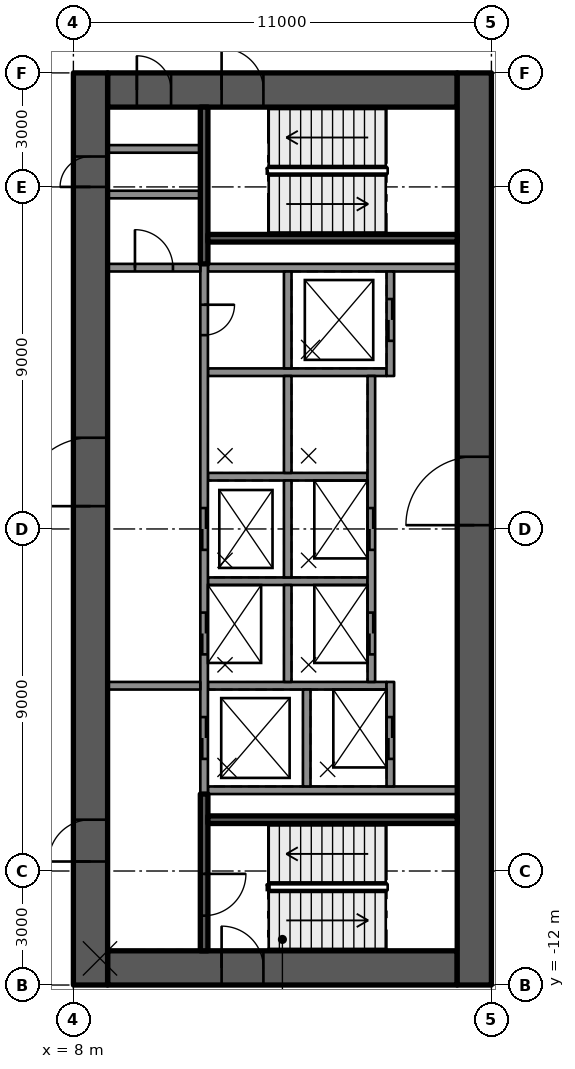
"""IFC4 building model, lengths in metres.
Left out: names, types, materials, properties, quantities, classifications, styles, units other than length and angle.
Written with IfcOpenShell. Run it as: python <this file> out.ifc"""

import sys

from ifc_helpers import new_model, si_unit, direction, frame, frame_2d, origin, place, context, subcontext, project, spatial, rectangle, extrude, element, fill, save


model = new_model("IFC4")
c1 = context("Model", 3, precision=1e-05, world=origin(), true_north=direction((0.0, 1.0)))
c2 = subcontext(c1, "Body", "Model", "MODEL_VIEW")
j1 = project(units=[si_unit("LENGTHUNIT", "METRE"), si_unit("PLANEANGLEUNIT", "RADIAN")], contexts=[c1])
p1 = place(None, origin())
s1 = spatial("IfcSite", under=j1, at=p1, CompositionType="ELEMENT")
p2 = place(p1, origin())
s2 = spatial("IfcBuilding", under=s1, at=p2, CompositionType="ELEMENT")
p3 = place(p2, frame((0.0, 0.0, 33.3)))
s3 = spatial("IfcBuildingStorey", under=s2, at=p3, CompositionType="ELEMENT", Elevation=33.3)
p4 = place(p3, frame((8.9, 11.55, 0.0), z_axis=(0.0, 0.0, 1.0), x_axis=(1.0, 0.0, 0.0)))
e1 = element("IfcWall", 1, at=p4, inside=s3, PredefinedType="SHEAR", context=c2, shape_type="SweptSolid", body=[
    extrude(rectangle(XDim=9.2, YDim=0.9, at=frame_2d((4.6, 0.0))), origin(), (0.0, 0.0, 1.0), 4.0),
])
p5 = place(p4, frame((3.0, 0.0, 0.0)))
e2 = element("IfcOpeningElement", 2, at=p5, cuts=e1, PredefinedType="OPENING", context=c2, shape_type="SweptSolid", body=[
    extrude(rectangle(XDim=1.1, YDim=2.1, at=frame_2d((0.55, 1.05))), frame((0.0, 0.46, 0.0), z_axis=(0.0, -1.0, 0.0), x_axis=(1.0, 0.0, 0.0)), (0.0, 0.0, 1.0), 0.92),
])
p6 = place(p4, frame((0.77, 0.0, 0.0)))
e3 = element("IfcOpeningElement", 3, at=p6, cuts=e1, PredefinedType="OPENING", context=c2, shape_type="SweptSolid", body=[
    extrude(rectangle(XDim=0.9, YDim=2.1, at=frame_2d((0.45, 1.05))), frame((0.0, 0.46, 0.0), z_axis=(0.0, -1.0, 0.0), x_axis=(1.0, 0.0, 0.0)), (0.0, 0.0, 1.0), 0.92),
])
p7 = place(p3, frame((8.9, -11.55, 0.0), z_axis=(0.0, 0.0, 1.0), x_axis=(1.0, 0.0, 0.0)))
e4 = element("IfcWall", 4, at=p7, inside=s3, PredefinedType="SHEAR", context=c2, shape_type="SweptSolid", body=[
    extrude(rectangle(XDim=9.2, YDim=0.9, at=frame_2d((4.6, 0.0))), origin(), (0.0, 0.0, 1.0), 4.0),
])
p8 = place(p7, frame((3.0, 0.0, 0.0)))
e5 = element("IfcOpeningElement", 5, at=p8, cuts=e4, PredefinedType="OPENING", context=c2, shape_type="SweptSolid", body=[
    extrude(rectangle(XDim=1.1, YDim=2.1, at=frame_2d((0.55, 1.05))), frame((0.0, 0.46, 0.0), z_axis=(0.0, -1.0, 0.0), x_axis=(1.0, 0.0, 0.0)), (0.0, 0.0, 1.0), 0.92),
])
p9 = place(p3, frame((8.45, -12.0, 0.0), z_axis=(0.0, 0.0, 1.0), x_axis=(0.0, 1.0, 0.0)))
e6 = element("IfcWall", 6, at=p9, inside=s3, PredefinedType="SHEAR", context=c2, shape_type="SweptSolid", body=[
    extrude(rectangle(XDim=24.0, YDim=0.9, at=frame_2d((12.0, 0.0))), origin(), (0.0, 0.0, 1.0), 4.0),
])
p10 = place(p9, frame((12.6, 0.0, 0.0)))
e7 = element("IfcOpeningElement", 7, at=p10, cuts=e6, PredefinedType="OPENING", context=c2, shape_type="SweptSolid", body=[
    extrude(rectangle(XDim=1.8, YDim=2.1, at=frame_2d((0.9, 1.05))), frame((0.0, 0.46, 0.0), z_axis=(0.0, -1.0, 0.0), x_axis=(1.0, 0.0, 0.0)), (0.0, 0.0, 1.0), 0.92),
])
p11 = place(p9, frame((3.25, 0.0, 0.0)))
e8 = element("IfcOpeningElement", 8, at=p11, cuts=e6, PredefinedType="OPENING", context=c2, shape_type="SweptSolid", body=[
    extrude(rectangle(XDim=1.1, YDim=2.1, at=frame_2d((0.55, 1.05))), frame((0.0, 0.46, 0.0), z_axis=(0.0, -1.0, 0.0), x_axis=(1.0, 0.0, 0.0)), (0.0, 0.0, 1.0), 0.92),
])
p12 = place(p9, frame((21.0, 0.0, 0.0)))
e9 = element("IfcOpeningElement", 9, at=p12, cuts=e6, PredefinedType="OPENING", context=c2, shape_type="SweptSolid", body=[
    extrude(rectangle(XDim=0.8, YDim=2.1, at=frame_2d((0.4, 1.05))), frame((0.0, 0.46, 0.0), z_axis=(0.0, -1.0, 0.0), x_axis=(1.0, 0.0, 0.0)), (0.0, 0.0, 1.0), 0.92),
])
p13 = place(p3, frame((18.55, -12.0, 0.0), z_axis=(0.0, 0.0, 1.0), x_axis=(0.0, 1.0, 0.0)))
e10 = element("IfcWall", 10, at=p13, inside=s3, PredefinedType="SHEAR", context=c2, shape_type="SweptSolid", body=[
    extrude(rectangle(XDim=24.0, YDim=0.9, at=frame_2d((12.0, 0.0))), origin(), (0.0, 0.0, 1.0), 4.0),
])
p14 = place(p13, frame((12.1, 0.0, 0.0)))
e11 = element("IfcOpeningElement", 11, at=p14, cuts=e10, PredefinedType="OPENING", context=c2, shape_type="SweptSolid", body=[
    extrude(rectangle(XDim=1.8, YDim=2.1, at=frame_2d((0.9, 1.05))), frame((0.0, 0.46, 0.0), z_axis=(0.0, -1.0, 0.0), x_axis=(1.0, 0.0, 0.0)), (0.0, 0.0, 1.0), 0.92),
])
for number, where, z_axis, x_axis in (
    (12, (11.54, -6.875, 0.0), (0.0, 0.0, 1.0), (1.0, 0.0, 0.0)),
    (13, (11.54, 6.875, 0.0), (0.0, 0.0, 1.0), (1.0, 0.0, 0.0)),
):
    element("IfcWall", number, at=place(p3, frame(where, z_axis=z_axis, x_axis=x_axis)), inside=s3, PredefinedType="SOLIDWALL", context=c2, shape_type="SweptSolid", body=[
        extrude(rectangle(XDim=6.56, YDim=0.2, at=frame_2d((3.28, 0.0))), origin(), (0.0, 0.0, 1.0), 3.58),
    ])
p15 = place(p3, frame((11.54, 4.125, 0.0), z_axis=(0.0, 0.0, 1.0), x_axis=(1.0, 0.0, 0.0)))
e14 = element("IfcWall", 14, at=p15, inside=s3, PredefinedType="SOLIDWALL", context=c2, shape_type="SweptSolid", body=[
    extrude(rectangle(XDim=4.7, YDim=0.2, at=frame_2d((2.35, 0.0))), origin(), (0.0, 0.0, 1.0), 3.58),
])
for number, where, z_axis, x_axis in (
    (15, (11.54, 1.375, 0.0), (0.0, 0.0, 1.0), (1.0, 0.0, 0.0)),
    (16, (11.54, -1.375, 0.0), (0.0, 0.0, 1.0), (1.0, 0.0, 0.0)),
):
    element("IfcWall", number, at=place(p3, frame(where, z_axis=z_axis, x_axis=x_axis)), inside=s3, PredefinedType="SOLIDWALL", context=c2, shape_type="SweptSolid", body=[
        extrude(rectangle(XDim=4.2, YDim=0.2, at=frame_2d((2.1, 0.0))), origin(), (0.0, 0.0, 1.0), 3.58),
    ])
p16 = place(p3, frame((11.54, -4.125, 0.0), z_axis=(0.0, 0.0, 1.0), x_axis=(1.0, 0.0, 0.0)))
e17 = element("IfcWall", 17, at=p16, inside=s3, PredefinedType="SOLIDWALL", context=c2, shape_type="SweptSolid", body=[
    extrude(rectangle(XDim=4.7, YDim=0.2, at=frame_2d((2.35, 0.0))), origin(), (0.0, 0.0, 1.0), 3.58),
])
p17 = place(p3, frame((11.44, 6.975, 0.0), z_axis=(0.0, 0.0, 1.0), x_axis=(0.0, -1.0, 0.0)))
e18 = element("IfcWall", 18, at=p17, inside=s3, PredefinedType="SOLIDWALL", context=c2, shape_type="SweptSolid", body=[
    extrude(rectangle(XDim=13.95, YDim=0.2, at=frame_2d((6.975, 0.0))), origin(), (0.0, 0.0, 1.0), 3.58),
])
p18 = place(p17, frame((6.425, 0.0, 0.0)))
e19 = element("IfcOpeningElement", 19, at=p18, cuts=e18, PredefinedType="OPENING", context=c2, shape_type="SweptSolid", body=[
    extrude(rectangle(XDim=1.1, YDim=2.1, at=frame_2d((0.55, 1.05))), frame((0.0, 0.11, 0.0), z_axis=(0.0, -1.0, 0.0), x_axis=(1.0, 0.0, 0.0)), (0.0, 0.0, 1.0), 0.22),
])
p19 = place(p17, frame((9.175, 0.0, 0.0)))
e20 = element("IfcOpeningElement", 20, at=p19, cuts=e18, PredefinedType="OPENING", context=c2, shape_type="SweptSolid", body=[
    extrude(rectangle(XDim=1.1, YDim=2.1, at=frame_2d((0.55, 1.05))), frame((0.0, 0.11, 0.0), z_axis=(0.0, -1.0, 0.0), x_axis=(1.0, 0.0, 0.0)), (0.0, 0.0, 1.0), 0.22),
])
p20 = place(p17, frame((11.925, 0.0, 0.0)))
e21 = element("IfcOpeningElement", 21, at=p20, cuts=e18, PredefinedType="OPENING", context=c2, shape_type="SweptSolid", body=[
    extrude(rectangle(XDim=1.1, YDim=2.1, at=frame_2d((0.55, 1.05))), frame((0.0, 0.11, 0.0), z_axis=(0.0, -1.0, 0.0), x_axis=(1.0, 0.0, 0.0)), (0.0, 0.0, 1.0), 0.22),
])
p21 = place(p17, frame((1.075, 0.0, 0.0)))
e22 = element("IfcOpeningElement", 22, at=p21, cuts=e18, PredefinedType="OPENING", context=c2, shape_type="SweptSolid", body=[
    extrude(rectangle(XDim=0.8, YDim=2.1, at=frame_2d((0.4, 1.05))), frame((0.0, 0.11, 0.0), z_axis=(0.0, -1.0, 0.0), x_axis=(1.0, 0.0, 0.0)), (0.0, 0.0, 1.0), 0.22),
])
for number, where, z_axis, x_axis in (
    (23, (13.64, 6.775, 0.0), (0.0, 0.0, 1.0), (0.0, -1.0, 0.0)),
    (24, (13.64, 4.025, 0.0), (0.0, 0.0, 1.0), (0.0, -1.0, 0.0)),
    (25, (13.64, 1.275, 0.0), (0.0, 0.0, 1.0), (0.0, -1.0, 0.0)),
    (26, (13.64, -1.475, 0.0), (0.0, 0.0, 1.0), (0.0, -1.0, 0.0)),
    (27, (14.14, -4.225, 0.0), (0.0, 0.0, 1.0), (0.0, -1.0, 0.0)),
):
    element("IfcWall", number, at=place(p3, frame(where, z_axis=z_axis, x_axis=x_axis)), inside=s3, PredefinedType="SOLIDWALL", context=c2, shape_type="SweptSolid", body=[
        extrude(rectangle(XDim=2.55, YDim=0.2, at=frame_2d((1.275, 0.0))), origin(), (0.0, 0.0, 1.0), 3.58),
    ])
p22 = place(p3, frame((16.34, 6.775, 0.0), z_axis=(0.0, 0.0, 1.0), x_axis=(0.0, -1.0, 0.0)))
e28 = element("IfcWall", 28, at=p22, inside=s3, PredefinedType="SOLIDWALL", context=c2, shape_type="SweptSolid", body=[
    extrude(rectangle(XDim=2.75, YDim=0.2, at=frame_2d((1.375, 0.0))), origin(), (0.0, 0.0, 1.0), 3.58),
])
p23 = place(p22, frame((0.725, 0.0, 0.0)))
e29 = element("IfcOpeningElement", 29, at=p23, cuts=e28, PredefinedType="OPENING", context=c2, shape_type="SweptSolid", body=[
    extrude(rectangle(XDim=1.1, YDim=2.1, at=frame_2d((0.55, 1.05))), frame((0.0, 0.11, 0.0), z_axis=(0.0, -1.0, 0.0), x_axis=(1.0, 0.0, 0.0)), (0.0, 0.0, 1.0), 0.22),
])
p24 = place(p3, frame((15.84, 4.025, 0.0), z_axis=(0.0, 0.0, 1.0), x_axis=(0.0, -1.0, 0.0)))
e30 = element("IfcWall", 30, at=p24, inside=s3, PredefinedType="SOLIDWALL", context=c2, shape_type="SweptSolid", body=[
    extrude(rectangle(XDim=8.05, YDim=0.2, at=frame_2d((4.025, 0.0))), origin(), (0.0, 0.0, 1.0), 3.58),
])
p25 = place(p24, frame((3.475, 0.0, 0.0)))
e31 = element("IfcOpeningElement", 31, at=p25, cuts=e30, PredefinedType="OPENING", context=c2, shape_type="SweptSolid", body=[
    extrude(rectangle(XDim=1.1, YDim=2.1, at=frame_2d((0.55, 1.05))), frame((0.0, 0.11, 0.0), z_axis=(0.0, -1.0, 0.0), x_axis=(1.0, 0.0, 0.0)), (0.0, 0.0, 1.0), 0.22),
])
p26 = place(p24, frame((6.225, 0.0, 0.0)))
e32 = element("IfcOpeningElement", 32, at=p26, cuts=e30, PredefinedType="OPENING", context=c2, shape_type="SweptSolid", body=[
    extrude(rectangle(XDim=1.1, YDim=2.1, at=frame_2d((0.55, 1.05))), frame((0.0, 0.11, 0.0), z_axis=(0.0, -1.0, 0.0), x_axis=(1.0, 0.0, 0.0)), (0.0, 0.0, 1.0), 0.22),
])
p27 = place(p3, frame((16.34, -4.025, 0.0), z_axis=(0.0, 0.0, 1.0), x_axis=(0.0, -1.0, 0.0)))
e33 = element("IfcWall", 33, at=p27, inside=s3, PredefinedType="SOLIDWALL", context=c2, shape_type="SweptSolid", body=[
    extrude(rectangle(XDim=2.75, YDim=0.2, at=frame_2d((1.375, 0.0))), origin(), (0.0, 0.0, 1.0), 3.58),
])
p28 = place(p27, frame((0.925, 0.0, 0.0)))
e34 = element("IfcOpeningElement", 34, at=p28, cuts=e33, PredefinedType="OPENING", context=c2, shape_type="SweptSolid", body=[
    extrude(rectangle(XDim=1.1, YDim=2.1, at=frame_2d((0.55, 1.05))), frame((0.0, 0.11, 0.0), z_axis=(0.0, -1.0, 0.0), x_axis=(1.0, 0.0, 0.0)), (0.0, 0.0, 1.0), 0.22),
])
p29 = place(p3, frame((11.44, -6.975, 0.0), z_axis=(0.0, 0.0, 1.0), x_axis=(0.0, -1.0, 0.0)))
e35 = element("IfcWall", 35, at=p29, inside=s3, PredefinedType="SOLIDWALL", context=c2, shape_type="SweptSolid", body=[
    extrude(rectangle(XDim=4.125, YDim=0.2, at=frame_2d((2.062, 0.0))), origin(), (0.0, 0.0, 1.0), 3.58),
])
p30 = place(p29, frame((2.1, 0.0, 0.0)))
e36 = element("IfcOpeningElement", 36, at=p30, cuts=e35, PredefinedType="OPENING", context=c2, shape_type="SweptSolid", body=[
    extrude(rectangle(XDim=1.1, YDim=2.1, at=frame_2d((0.55, 1.05))), frame((0.0, 0.11, 0.0), z_axis=(0.0, -1.0, 0.0), x_axis=(1.0, 0.0, 0.0)), (0.0, 0.0, 1.0), 0.22),
])
p31 = place(p3, frame((11.54, -7.65, 0.0), z_axis=(0.0, 0.0, 1.0), x_axis=(1.0, 0.0, 0.0)))
e37 = element("IfcWall", 37, at=p31, inside=s3, PredefinedType="SOLIDWALL", context=c2, shape_type="SweptSolid", body=[
    extrude(rectangle(XDim=6.56, YDim=0.2, at=frame_2d((3.28, 0.0))), origin(), (0.0, 0.0, 1.0), 3.58),
])
p32 = place(p3, frame((11.44, 11.1, 0.0), z_axis=(0.0, 0.0, 1.0), x_axis=(0.0, -1.0, 0.0)))
e38 = element("IfcWall", 38, at=p32, inside=s3, PredefinedType="SOLIDWALL", context=c2, shape_type="SweptSolid", body=[
    extrude(rectangle(XDim=4.125, YDim=0.2, at=frame_2d((2.062, 0.0))), origin(), (0.0, 0.0, 1.0), 3.58),
])
p33 = place(p3, frame((11.54, 7.65, 0.0), z_axis=(0.0, 0.0, 1.0), x_axis=(1.0, 0.0, 0.0)))
e39 = element("IfcWall", 39, at=p33, inside=s3, PredefinedType="SOLIDWALL", context=c2, shape_type="SweptSolid", body=[
    extrude(rectangle(XDim=6.56, YDim=0.2, at=frame_2d((3.28, 0.0))), origin(), (0.0, 0.0, 1.0), 3.58),
])
p34 = place(p3, frame((8.9, -4.125, 0.0), z_axis=(0.0, 0.0, 1.0), x_axis=(1.0, 0.0, 0.0)))
e40 = element("IfcWall", 40, at=p34, inside=s3, PredefinedType="PARTITIONING", context=c2, shape_type="SweptSolid", body=[
    extrude(rectangle(XDim=2.44, YDim=0.2, at=frame_2d((1.22, 0.0))), origin(), (0.0, 0.0, 1.0), 3.58),
])
p35 = place(p3, frame((8.9, 6.875, 0.0), z_axis=(0.0, 0.0, 1.0), x_axis=(1.0, 0.0, 0.0)))
e41 = element("IfcWall", 41, at=p35, inside=s3, PredefinedType="PARTITIONING", context=c2, shape_type="SweptSolid", body=[
    extrude(rectangle(XDim=2.44, YDim=0.2, at=frame_2d((1.22, 0.0))), origin(), (0.0, 0.0, 1.0), 3.58),
])
p36 = place(p35, frame((0.72, 0.0, 0.0)))
e42 = element("IfcOpeningElement", 42, at=p36, cuts=e41, PredefinedType="OPENING", context=c2, shape_type="SweptSolid", body=[
    extrude(rectangle(XDim=1.0, YDim=2.1, at=frame_2d((0.5, 1.05))), frame((0.0, 0.11, 0.0), z_axis=(0.0, -1.0, 0.0), x_axis=(1.0, 0.0, 0.0)), (0.0, 0.0, 1.0), 0.22),
])
for number, where, z_axis, x_axis in (
    (43, (8.9, 10.0, 0.0), (0.0, 0.0, 1.0), (1.0, 0.0, 0.0)),
    (44, (8.9, 8.8, 0.0), (0.0, 0.0, 1.0), (1.0, 0.0, 0.0)),
):
    element("IfcWall", number, at=place(p3, frame(where, z_axis=z_axis, x_axis=x_axis)), inside=s3, PredefinedType="PARTITIONING", context=c2, shape_type="SweptSolid", body=[
        extrude(rectangle(XDim=2.44, YDim=0.2, at=frame_2d((1.22, 0.0))), origin(), (0.0, 0.0, 1.0), 3.58),
    ])
p37 = place(p23, origin())
e45 = element("IfcDoor", 45, at=p37, inside=s3, OperationType="DOUBLE_DOOR_SLIDING", PredefinedType="DOOR", context=c2, shape_type="SweptSolid", body=[
    extrude(rectangle(XDim=1.1, YDim=2.1, at=frame_2d((0.55, 1.05))), frame((0.0, 0.025, 0.0), z_axis=(0.0, -1.0, 0.0), x_axis=(1.0, 0.0, 0.0)), (0.0, 0.0, 1.0), 0.05),
])
fill(e29, e45)
p38 = place(p18, origin())
e46 = element("IfcDoor", 46, at=p38, inside=s3, OperationType="DOUBLE_DOOR_SLIDING", PredefinedType="DOOR", context=c2, shape_type="SweptSolid", body=[
    extrude(rectangle(XDim=1.1, YDim=2.1, at=frame_2d((0.55, 1.05))), frame((0.0, 0.025, 0.0), z_axis=(0.0, -1.0, 0.0), x_axis=(1.0, 0.0, 0.0)), (0.0, 0.0, 1.0), 0.05),
])
fill(e19, e46)
p39 = place(p25, origin())
e47 = element("IfcDoor", 47, at=p39, inside=s3, OperationType="DOUBLE_DOOR_SLIDING", PredefinedType="DOOR", context=c2, shape_type="SweptSolid", body=[
    extrude(rectangle(XDim=1.1, YDim=2.1, at=frame_2d((0.55, 1.05))), frame((0.0, 0.025, 0.0), z_axis=(0.0, -1.0, 0.0), x_axis=(1.0, 0.0, 0.0)), (0.0, 0.0, 1.0), 0.05),
])
fill(e31, e47)
p40 = place(p19, origin())
e48 = element("IfcDoor", 48, at=p40, inside=s3, OperationType="DOUBLE_DOOR_SLIDING", PredefinedType="DOOR", context=c2, shape_type="SweptSolid", body=[
    extrude(rectangle(XDim=1.1, YDim=2.1, at=frame_2d((0.55, 1.05))), frame((0.0, 0.025, 0.0), z_axis=(0.0, -1.0, 0.0), x_axis=(1.0, 0.0, 0.0)), (0.0, 0.0, 1.0), 0.05),
])
fill(e20, e48)
p41 = place(p26, origin())
e49 = element("IfcDoor", 49, at=p41, inside=s3, OperationType="DOUBLE_DOOR_SLIDING", PredefinedType="DOOR", context=c2, shape_type="SweptSolid", body=[
    extrude(rectangle(XDim=1.1, YDim=2.1, at=frame_2d((0.55, 1.05))), frame((0.0, 0.025, 0.0), z_axis=(0.0, -1.0, 0.0), x_axis=(1.0, 0.0, 0.0)), (0.0, 0.0, 1.0), 0.05),
])
fill(e32, e49)
p42 = place(p20, origin())
e50 = element("IfcDoor", 50, at=p42, inside=s3, OperationType="DOUBLE_DOOR_SLIDING", PredefinedType="DOOR", context=c2, shape_type="SweptSolid", body=[
    extrude(rectangle(XDim=1.1, YDim=2.1, at=frame_2d((0.55, 1.05))), frame((0.0, 0.025, 0.0), z_axis=(0.0, -1.0, 0.0), x_axis=(1.0, 0.0, 0.0)), (0.0, 0.0, 1.0), 0.05),
])
fill(e21, e50)
p43 = place(p28, origin())
e51 = element("IfcDoor", 51, at=p43, inside=s3, OperationType="DOUBLE_DOOR_SLIDING", PredefinedType="DOOR", context=c2, shape_type="SweptSolid", body=[
    extrude(rectangle(XDim=1.1, YDim=2.1, at=frame_2d((0.55, 1.05))), frame((0.0, 0.025, 0.0), z_axis=(0.0, -1.0, 0.0), x_axis=(1.0, 0.0, 0.0)), (0.0, 0.0, 1.0), 0.05),
])
fill(e34, e51)
p44 = place(p21, origin())
e52 = element("IfcDoor", 52, at=p44, inside=s3, OperationType="SINGLE_SWING_LEFT", PredefinedType="DOOR", context=c2, shape_type="SweptSolid", body=[
    extrude(rectangle(XDim=0.8, YDim=2.1, at=frame_2d((0.4, 1.05))), frame((0.0, 0.025, 0.0), z_axis=(0.0, -1.0, 0.0), x_axis=(1.0, 0.0, 0.0)), (0.0, 0.0, 1.0), 0.05),
])
fill(e22, e52)
p45 = place(p10, origin())
e53 = element("IfcDoor", 53, at=p45, inside=s3, OperationType="SINGLE_SWING_RIGHT", PredefinedType="DOOR", context=c2, shape_type="SweptSolid", body=[
    extrude(rectangle(XDim=1.8, YDim=2.1, at=frame_2d((0.9, 1.05))), frame((0.0, 0.025, 0.0), z_axis=(0.0, -1.0, 0.0), x_axis=(1.0, 0.0, 0.0)), (0.0, 0.0, 1.0), 0.05),
])
fill(e7, e53)
p46 = place(p14, origin())
e54 = element("IfcDoor", 54, at=p46, inside=s3, OperationType="SINGLE_SWING_RIGHT", PredefinedType="DOOR", context=c2, shape_type="SweptSolid", body=[
    extrude(rectangle(XDim=1.8, YDim=2.1, at=frame_2d((0.9, 1.05))), frame((0.0, 0.025, 0.0), z_axis=(0.0, -1.0, 0.0), x_axis=(1.0, 0.0, 0.0)), (0.0, 0.0, 1.0), 0.05),
])
fill(e11, e54)
p47 = place(p11, origin())
e55 = element("IfcDoor", 55, at=p47, inside=s3, OperationType="SINGLE_SWING_LEFT", PredefinedType="DOOR", context=c2, shape_type="SweptSolid", body=[
    extrude(rectangle(XDim=1.1, YDim=2.1, at=frame_2d((0.55, 1.05))), frame((0.0, 0.025, 0.0), z_axis=(0.0, -1.0, 0.0), x_axis=(1.0, 0.0, 0.0)), (0.0, 0.0, 1.0), 0.05),
])
fill(e8, e55)
p48 = place(p8, origin())
e56 = element("IfcDoor", 56, at=p48, inside=s3, OperationType="SINGLE_SWING_LEFT", PredefinedType="DOOR", context=c2, shape_type="SweptSolid", body=[
    extrude(rectangle(XDim=1.1, YDim=2.1, at=frame_2d((0.55, 1.05))), frame((0.0, 0.025, 0.0), z_axis=(0.0, -1.0, 0.0), x_axis=(1.0, 0.0, 0.0)), (0.0, 0.0, 1.0), 0.05),
])
fill(e5, e56)
p49 = place(p5, origin())
e57 = element("IfcDoor", 57, at=p49, inside=s3, OperationType="SINGLE_SWING_LEFT", PredefinedType="DOOR", context=c2, shape_type="SweptSolid", body=[
    extrude(rectangle(XDim=1.1, YDim=2.1, at=frame_2d((0.55, 1.05))), frame((0.0, 0.025, 0.0), z_axis=(0.0, -1.0, 0.0), x_axis=(1.0, 0.0, 0.0)), (0.0, 0.0, 1.0), 0.05),
])
fill(e2, e57)
p50 = place(p30, origin())
e58 = element("IfcDoor", 58, at=p50, inside=s3, OperationType="SINGLE_SWING_RIGHT", PredefinedType="DOOR", context=c2, shape_type="SweptSolid", body=[
    extrude(rectangle(XDim=1.1, YDim=2.1, at=frame_2d((0.55, 1.05))), frame((0.0, 0.025, 0.0), z_axis=(0.0, -1.0, 0.0), x_axis=(1.0, 0.0, 0.0)), (0.0, 0.0, 1.0), 0.05),
])
fill(e36, e58)
p51 = place(p6, origin())
e59 = element("IfcDoor", 59, at=p51, inside=s3, OperationType="SINGLE_SWING_LEFT", PredefinedType="DOOR", context=c2, shape_type="SweptSolid", body=[
    extrude(rectangle(XDim=0.9, YDim=2.1, at=frame_2d((0.45, 1.05))), frame((0.0, 0.025, 0.0), z_axis=(0.0, -1.0, 0.0), x_axis=(1.0, 0.0, 0.0)), (0.0, 0.0, 1.0), 0.05),
])
fill(e3, e59)
p52 = place(p12, origin())
e60 = element("IfcDoor", 60, at=p52, inside=s3, OperationType="SINGLE_SWING_RIGHT", PredefinedType="DOOR", context=c2, shape_type="SweptSolid", body=[
    extrude(rectangle(XDim=0.8, YDim=2.1, at=frame_2d((0.4, 1.05))), frame((0.0, 0.025, 0.0), z_axis=(0.0, -1.0, 0.0), x_axis=(1.0, 0.0, 0.0)), (0.0, 0.0, 1.0), 0.05),
])
fill(e9, e60)
p53 = place(p36, origin())
e61 = element("IfcDoor", 61, at=p53, inside=s3, OperationType="SINGLE_SWING_RIGHT", PredefinedType="DOOR", context=c2, shape_type="SweptSolid", body=[
    extrude(rectangle(XDim=1.0, YDim=2.1, at=frame_2d((0.5, 1.05))), frame((0.0, 0.025, 0.0), z_axis=(0.0, -1.0, 0.0), x_axis=(1.0, 0.0, 0.0)), (0.0, 0.0, 1.0), 0.05),
])
fill(e42, e61)
save(model, sys.argv[1])
